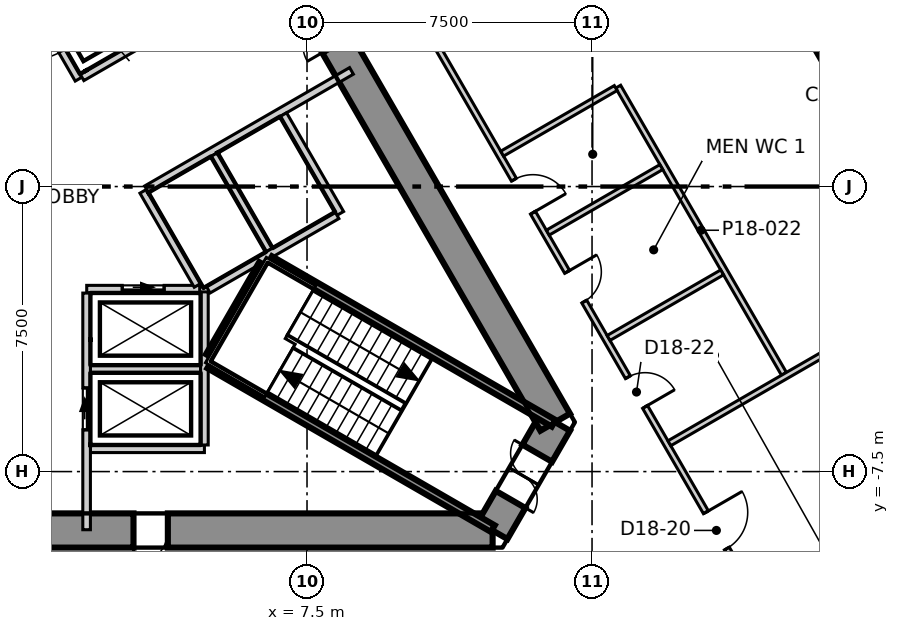
"""IFC4 building model, lengths in metres.
Left out: names, types, materials, properties, quantities, classifications, styles, units other than length and angle.
Written with IfcOpenShell. Run it as: python <this file> out.ifc"""

import sys

from ifc_helpers import new_model, si_unit, direction, frame, frame_2d, origin, origin_2d, place, context, subcontext, project, spatial, polyline, rectangle, outline, extrude, element, fill, save


model = new_model("IFC4")
c1 = context("Model", 3, precision=1e-05, world=origin(), true_north=direction((0.0, 1.0)))
c2 = subcontext(c1, "Body", "Model", "MODEL_VIEW")
j1 = project(units=[si_unit("LENGTHUNIT", "METRE"), si_unit("PLANEANGLEUNIT", "RADIAN")], contexts=[c1])
p1 = place(None, origin())
s1 = spatial("IfcSite", under=j1, at=p1, CompositionType="ELEMENT")
p2 = place(p1, origin())
s2 = spatial("IfcBuilding", under=s1, at=p2, CompositionType="ELEMENT")
p3 = place(p2, frame((0.0, 0.0, 83.3)))
s3 = spatial("IfcBuildingStorey", under=s2, at=p3, CompositionType="ELEMENT", Elevation=83.3)
p4 = place(p3, frame((-12.384, -9.05, -0.3), z_axis=(0.0, 0.0, 1.0), x_axis=(1.0, 0.0, 0.0)))
e1 = element("IfcWall", 1, at=p4, inside=s3, PredefinedType="SHEAR", context=c2, shape_type="SweptSolid", body=[
    extrude(outline(polyline([(-0.26, -0.45), (1.685, -0.45), (3.63, -0.45), (5.576, -0.45), (7.521, -0.45), (9.466, -0.45), (11.411, -0.45), (13.357, -0.45), (15.302, -0.45), (17.247, -0.45), (19.192, -0.45), (21.138, -0.45), (23.083, -0.45), (25.028, -0.45), (24.508, 0.45), (22.643, 0.45), (20.778, 0.45), (18.912, 0.45), (17.047, 0.45), (15.182, 0.45), (13.317, 0.45), (11.451, 0.45), (9.586, 0.45), (7.721, 0.45), (5.856, 0.45), (3.99, 0.45), (2.125, 0.45), (0.26, 0.45), (-0.26, -0.45)])), origin(), (0.0, 0.0, 1.0), 4.0),
])
p5 = place(p4, frame((4.05, 0.0, 0.3)))
e2 = element("IfcOpeningElement", 2, at=p5, cuts=e1, PredefinedType="OPENING", context=c2, shape_type="SweptSolid", body=[
    extrude(rectangle(XDim=0.9, YDim=2.1, at=frame_2d((0.45, 1.05))), frame((0.0, 0.46, 0.0), z_axis=(0.0, -1.0, 0.0), x_axis=(1.0, 0.0, 0.0)), (0.0, 0.0, 1.0), 0.92),
])
p6 = place(p4, frame((15.32, 0.0, 0.3)))
e3 = element("IfcOpeningElement", 3, at=p6, cuts=e1, PredefinedType="OPENING", context=c2, shape_type="SweptSolid", body=[
    extrude(rectangle(XDim=0.9, YDim=2.1, at=frame_2d((0.45, 1.05))), frame((0.0, 0.46, 0.0), z_axis=(0.0, -1.0, 0.0), x_axis=(1.0, 0.0, 0.0)), (0.0, 0.0, 1.0), 0.92),
])
p7 = place(p3, frame((12.384, -9.05, -0.3), z_axis=(0.0, 0.0, 1.0), x_axis=(0.500111984565, 0.865960739811, 0.0)))
e4 = element("IfcWall", 4, at=p7, inside=s3, PredefinedType="SHEAR", context=c2, shape_type="SweptSolid", body=[
    extrude(outline(polyline([(-0.26, -0.45), (1.646, -0.449), (3.551, -0.449), (3.031, 0.45), (1.646, 0.45), (0.26, 0.45), (-0.26, -0.45)])), origin(), (0.0, 0.0, 1.0), 4.0),
])
p8 = place(p7, frame((0.946, 0.0, 0.3)))
e5 = element("IfcOpeningElement", 5, at=p8, cuts=e4, PredefinedType="OPENING", context=c2, shape_type="SweptSolid", body=[
    extrude(rectangle(XDim=1.4, YDim=2.1, at=frame_2d((0.7, 1.05))), frame((0.0, 0.46, 0.0), z_axis=(0.0, -1.0, 0.0), x_axis=(1.0, 0.0, 0.0)), (0.0, 0.0, 1.0), 0.92),
])
p9 = place(p3, frame((14.03, -6.2, -0.3), z_axis=(0.0, 0.0, 1.0), x_axis=(-0.500026485275, 0.866010111964, 0.0)))
e6 = element("IfcWall", 6, at=p9, inside=s3, PredefinedType="SHEAR", context=c2, shape_type="SweptSolid", body=[
    extrude(outline(polyline([(-0.26, -0.449), (1.685, -0.449), (3.63, -0.449), (5.576, -0.449), (7.521, -0.449), (9.466, -0.449), (11.411, -0.449), (13.357, -0.449), (15.302, -0.449), (17.247, -0.45), (19.192, -0.45), (21.138, -0.45), (23.083, -0.45), (25.028, -0.45), (24.509, 0.449), (22.644, 0.449), (20.778, 0.449), (18.913, 0.449), (17.048, 0.449), (15.182, 0.449), (13.317, 0.449), (11.452, 0.449), (9.587, 0.449), (7.721, 0.45), (5.856, 0.45), (3.991, 0.45), (2.125, 0.45), (0.26, 0.45), (-0.26, -0.449)])), origin(), (0.0, 0.0, 1.0), 4.0),
])
p10 = place(p9, frame((11.484, 0.0, 0.3)))
e7 = element("IfcOpeningElement", 7, at=p10, cuts=e6, PredefinedType="OPENING", context=c2, shape_type="SweptSolid", body=[
    extrude(rectangle(XDim=1.8, YDim=2.1, at=frame_2d((0.9, 1.05))), frame((0.0, 0.46, 0.0), z_axis=(0.0, -1.0, 0.0), x_axis=(1.0, 0.0, 0.0)), (0.0, 0.0, 1.0), 0.92),
])
p11 = place(p9, frame((18.926, 0.0, 0.3)))
e8 = element("IfcOpeningElement", 8, at=p11, cuts=e6, PredefinedType="OPENING", context=c2, shape_type="SweptSolid", body=[
    extrude(rectangle(XDim=1.0, YDim=2.1, at=frame_2d((0.5, 1.05))), frame((0.0, 0.46, 0.0), z_axis=(0.0, -1.0, 0.0), x_axis=(1.0, 0.0, 0.0)), (0.0, 0.0, 1.0), 0.92),
])
p12 = place(p3, frame((21.284, 3.993, -0.3), z_axis=(0.0, 0.0, 1.0), x_axis=(-0.5, 0.866025403784, 0.0)))
e9 = element("IfcColumn", 9, at=p12, inside=s3, PredefinedType="COLUMN", context=c2, shape_type="SweptSolid", body=[
    extrude(rectangle(XDim=1.4, YDim=1.1, at=origin_2d()), origin(), (0.0, 0.0, 1.0), 4.0),
])
p13 = place(p3, frame((33.317, -15.448, 0.0), z_axis=(0.0, 0.0, 1.0), x_axis=(-0.499999874703, 0.866025476125, 0.0)))
e10 = element("IfcWall", 10, at=p13, inside=s3, PredefinedType="ELEMENTEDWALL", context=c2, shape_type="SweptSolid", body=[
    extrude(rectangle(XDim=60.054, YDim=0.2, at=frame_2d((30.027, 0.0))), origin(), (0.0, 0.0, 1.0), 3.7),
])
p14 = place(p13, frame((2.094, 0.0, 0.9)))
e11 = element("IfcOpeningElement", 11, at=p14, cuts=e10, PredefinedType="OPENING", context=c2, shape_type="SweptSolid", body=[
    extrude(rectangle(XDim=5.6, YDim=2.5, at=frame_2d((2.8, 1.25))), frame((0.0, 0.11, 0.0), z_axis=(0.0, -1.0, 0.0), x_axis=(1.0, 0.0, 0.0)), (0.0, 0.0, 1.0), 0.22),
])
p15 = place(p13, frame((9.278, 0.0, 0.9)))
e12 = element("IfcOpeningElement", 12, at=p15, cuts=e10, PredefinedType="OPENING", context=c2, shape_type="SweptSolid", body=[
    extrude(rectangle(XDim=5.6, YDim=2.5, at=frame_2d((2.8, 1.25))), frame((0.0, 0.11, 0.0), z_axis=(0.0, -1.0, 0.0), x_axis=(1.0, 0.0, 0.0)), (0.0, 0.0, 1.0), 0.22),
])
p16 = place(p13, frame((16.462, 0.0, 0.9)))
e13 = element("IfcOpeningElement", 13, at=p16, cuts=e10, PredefinedType="OPENING", context=c2, shape_type="SweptSolid", body=[
    extrude(rectangle(XDim=5.6, YDim=2.5, at=frame_2d((2.8, 1.25))), frame((0.0, 0.11, 0.0), z_axis=(0.0, -1.0, 0.0), x_axis=(1.0, 0.0, 0.0)), (0.0, 0.0, 1.0), 0.22),
])
p17 = place(p13, frame((23.645, 0.0, 0.9)))
e14 = element("IfcOpeningElement", 14, at=p17, cuts=e10, PredefinedType="OPENING", context=c2, shape_type="SweptSolid", body=[
    extrude(rectangle(XDim=5.6, YDim=2.5, at=frame_2d((2.8, 1.25))), frame((0.0, 0.11, 0.0), z_axis=(0.0, -1.0, 0.0), x_axis=(1.0, 0.0, 0.0)), (0.0, 0.0, 1.0), 0.22),
])
p18 = place(p13, frame((30.829, 0.0, 0.9)))
e15 = element("IfcOpeningElement", 15, at=p18, cuts=e10, PredefinedType="OPENING", context=c2, shape_type="SweptSolid", body=[
    extrude(rectangle(XDim=5.6, YDim=2.5, at=frame_2d((2.8, 1.25))), frame((0.0, 0.11, 0.0), z_axis=(0.0, -1.0, 0.0), x_axis=(1.0, 0.0, 0.0)), (0.0, 0.0, 1.0), 0.22),
])
p19 = place(p13, frame((38.012, 0.0, 0.9)))
e16 = element("IfcOpeningElement", 16, at=p19, cuts=e10, PredefinedType="OPENING", context=c2, shape_type="SweptSolid", body=[
    extrude(rectangle(XDim=5.6, YDim=2.5, at=frame_2d((2.8, 1.25))), frame((0.0, 0.11, 0.0), z_axis=(0.0, -1.0, 0.0), x_axis=(1.0, 0.0, 0.0)), (0.0, 0.0, 1.0), 0.22),
])
p20 = place(p13, frame((45.196, 0.0, 0.9)))
e17 = element("IfcOpeningElement", 17, at=p20, cuts=e10, PredefinedType="OPENING", context=c2, shape_type="SweptSolid", body=[
    extrude(rectangle(XDim=5.6, YDim=2.5, at=frame_2d((2.8, 1.25))), frame((0.0, 0.11, 0.0), z_axis=(0.0, -1.0, 0.0), x_axis=(1.0, 0.0, 0.0)), (0.0, 0.0, 1.0), 0.22),
])
p21 = place(p13, frame((52.379, 0.0, 0.9)))
e18 = element("IfcOpeningElement", 18, at=p21, cuts=e10, PredefinedType="OPENING", context=c2, shape_type="SweptSolid", body=[
    extrude(rectangle(XDim=5.6, YDim=2.5, at=frame_2d((2.8, 1.25))), frame((0.0, 0.11, 0.0), z_axis=(0.0, -1.0, 0.0), x_axis=(1.0, 0.0, 0.0)), (0.0, 0.0, 1.0), 0.22),
])
p22 = place(p3, frame((0.075, 22.47, 0.0), z_axis=(0.0, 0.0, 1.0), x_axis=(0.500002280369, -0.866024087209, 0.0)))
e19 = element("IfcWall", 19, at=p22, inside=s3, PredefinedType="PARTITIONING", context=c2, shape_type="SweptSolid", body=[
    extrude(rectangle(XDim=38.844, YDim=0.15, at=frame_2d((19.422, 0.0))), origin(), (0.0, 0.0, 1.0), 3.7),
])
p23 = place(p22, frame((35.844, 0.0, 0.0)))
e20 = element("IfcOpeningElement", 20, at=p23, cuts=e19, PredefinedType="OPENING", context=c2, shape_type="SweptSolid", body=[
    extrude(rectangle(XDim=1.1, YDim=2.1, at=frame_2d((0.55, 1.05))), frame((0.0, 0.085, 0.0), z_axis=(0.0, -1.0, 0.0), x_axis=(1.0, 0.0, 0.0)), (0.0, 0.0, 1.0), 0.17),
])
p24 = place(p22, frame((14.44, 0.0, 0.0)))
e21 = element("IfcOpeningElement", 21, at=p24, cuts=e19, PredefinedType="OPENING", context=c2, shape_type="SweptSolid", body=[
    extrude(rectangle(XDim=1.1, YDim=2.1, at=frame_2d((0.55, 1.05))), frame((0.0, 0.085, 0.0), z_axis=(0.0, -1.0, 0.0), x_axis=(1.0, 0.0, 0.0)), (0.0, 0.0, 1.0), 0.17),
])
p25 = place(p22, frame((31.74, 0.0, 0.0)))
e22 = element("IfcOpeningElement", 22, at=p25, cuts=e19, PredefinedType="OPENING", context=c2, shape_type="SweptSolid", body=[
    extrude(rectangle(XDim=0.9, YDim=2.1, at=frame_2d((0.45, 1.05))), frame((0.0, 0.085, 0.0), z_axis=(0.0, -1.0, 0.0), x_axis=(1.0, 0.0, 0.0)), (0.0, 0.0, 1.0), 0.17),
])
p26 = place(p22, frame((28.54, 0.0, 0.0)))
e23 = element("IfcOpeningElement", 23, at=p26, cuts=e19, PredefinedType="OPENING", context=c2, shape_type="SweptSolid", body=[
    extrude(rectangle(XDim=0.9, YDim=2.1, at=frame_2d((0.45, 1.05))), frame((0.0, 0.085, 0.0), z_axis=(0.0, -1.0, 0.0), x_axis=(1.0, 0.0, 0.0)), (0.0, 0.0, 1.0), 0.17),
])
p27 = place(p22, frame((25.74, 0.0, 0.0)))
e24 = element("IfcOpeningElement", 24, at=p27, cuts=e19, PredefinedType="OPENING", context=c2, shape_type="SweptSolid", body=[
    extrude(rectangle(XDim=1.0, YDim=2.1, at=frame_2d((0.5, 1.05))), frame((0.0, 0.085, 0.0), z_axis=(0.0, -1.0, 0.0), x_axis=(1.0, 0.0, 0.0)), (0.0, 0.0, 1.0), 0.17),
])
p28 = place(p22, frame((1.905, 0.0, 0.0)))
e25 = element("IfcOpeningElement", 25, at=p28, cuts=e19, PredefinedType="OPENING", context=c2, shape_type="SweptSolid", body=[
    extrude(rectangle(XDim=1.1, YDim=2.1, at=frame_2d((0.55, 1.05))), frame((0.0, 0.085, 0.0), z_axis=(0.0, -1.0, 0.0), x_axis=(1.0, 0.0, 0.0)), (0.0, 0.0, 1.0), 0.17),
])
p29 = place(p3, frame((15.688, 2.628, 0.0), z_axis=(0.0, 0.0, 1.0), x_axis=(0.499970334739, -0.866042530354, 0.0)))
e26 = element("IfcWall", 26, at=p29, inside=s3, PredefinedType="PARTITIONING", context=c2, shape_type="SweptSolid", body=[
    extrude(rectangle(XDim=8.725, YDim=0.15, at=frame_2d((4.362, 0.0))), origin(), (0.0, 0.0, 1.0), 3.7),
])
for number, where, z_axis, x_axis in (
    (27, (12.635, 0.866, 0.0), (0.0, 0.0, 1.0), (0.866, 0.5, 0.0)),
    (28, (13.835, -1.213, 0.0), (0.0, 0.0, 1.0), (0.866, 0.5, 0.0)),
    (29, (15.435, -3.984, 0.0), (0.0, 0.0, 1.0), (0.866, 0.5, 0.0)),
):
    element("IfcWall", number, at=place(p3, frame(where, z_axis=z_axis, x_axis=x_axis)), inside=s3, PredefinedType="PARTITIONING", context=c2, shape_type="SweptSolid", body=[
        extrude(rectangle(XDim=3.45, YDim=0.15, at=frame_2d((1.725, 0.0))), origin(), (0.0, 0.0, 1.0), 3.7),
    ])
p30 = place(p3, frame((17.035, -6.755, 0.0), z_axis=(0.0, 0.0, 1.0), x_axis=(0.866035557451, 0.499982412921, 0.0)))
e30 = element("IfcWall", 30, at=p30, inside=s3, PredefinedType="PARTITIONING", context=c2, shape_type="SweptSolid", body=[
    extrude(rectangle(XDim=9.674, YDim=0.15, at=frame_2d((4.837, 0.0))), origin(), (0.0, 0.0, 1.0), 3.7),
])
p31 = place(p3, frame((1.8, -4.8, 0.0), z_axis=(0.0, 0.0, 1.0), x_axis=(1.0, 0.0, 0.0)))
e31 = element("IfcWall", 31, at=p31, inside=s3, PredefinedType="SOLIDWALL", context=c2, shape_type="SweptSolid", body=[
    extrude(rectangle(XDim=2.9, YDim=0.2, at=frame_2d((1.45, 0.0))), origin(), (0.0, 0.0, 1.0), 3.7),
])
p32 = place(p3, frame((1.8, -6.9, 0.0), z_axis=(0.0, 0.0, 1.0), x_axis=(1.0, 0.0, 0.0)))
e32 = element("IfcWall", 32, at=p32, inside=s3, PredefinedType="SOLIDWALL", context=c2, shape_type="SweptSolid", body=[
    extrude(rectangle(XDim=3.0, YDim=0.2, at=frame_2d((1.5, 0.0))), origin(), (0.0, 0.0, 1.0), 3.7),
])
p33 = place(p3, frame((1.703, -2.7, 0.0), z_axis=(0.0, 0.0, 1.0), x_axis=(1.0, 0.0, 0.0)))
e33 = element("IfcWall", 33, at=p33, inside=s3, PredefinedType="SOLIDWALL", context=c2, shape_type="SweptSolid", body=[
    extrude(rectangle(XDim=2.973, YDim=0.2, at=frame_2d((1.487, 0.0))), origin(), (0.0, 0.0, 1.0), 3.7),
])
p34 = place(p33, frame((0.936, 0.0, 0.0)))
e34 = element("IfcOpeningElement", 34, at=p34, cuts=e33, PredefinedType="OPENING", context=c2, shape_type="SweptSolid", body=[
    extrude(rectangle(XDim=1.1, YDim=2.1, at=frame_2d((0.55, 1.05))), frame((0.0, 0.11, 0.0), z_axis=(0.0, -1.0, 0.0), x_axis=(1.0, 0.0, 0.0)), (0.0, 0.0, 1.0), 0.22),
])
p35 = place(p3, frame((0.0, 5.4, 0.0), z_axis=(0.0, 0.0, 1.0), x_axis=(0.500103862429, -0.865965430478, 0.0)))
e35 = element("IfcWall", 35, at=p35, inside=s3, PredefinedType="SOLIDWALL", context=c2, shape_type="SweptSolid", body=[
    extrude(rectangle(XDim=2.973, YDim=0.2, at=frame_2d((1.487, 0.0))), origin(), (0.0, 0.0, 1.0), 3.7),
])
p36 = place(p35, frame((0.937, 0.0, 0.0)))
e36 = element("IfcOpeningElement", 36, at=p36, cuts=e35, PredefinedType="OPENING", context=c2, shape_type="SweptSolid", body=[
    extrude(rectangle(XDim=1.1, YDim=2.1, at=frame_2d((0.55, 1.05))), frame((0.0, 0.11, 0.0), z_axis=(0.0, -1.0, 0.0), x_axis=(1.0, 0.0, 0.0)), (0.0, 0.0, 1.0), 0.22),
])
p37 = place(p3, frame((3.19, -0.125, 0.0), z_axis=(0.0, 0.0, 1.0), x_axis=(0.499988658015, -0.866031951983, 0.0)))
e37 = element("IfcWall", 37, at=p37, inside=s3, PredefinedType="SOLIDWALL", context=c2, shape_type="SweptSolid", body=[
    extrude(rectangle(XDim=2.858, YDim=0.2, at=frame_2d((1.429, 0.0))), origin(), (0.0, 0.0, 1.0), 3.7),
])
p38 = place(p3, frame((1.578, 2.874, 0.0), z_axis=(0.0, 0.0, 1.0), x_axis=(0.866031483044, 0.499989470266, 0.0)))
e38 = element("IfcWall", 38, at=p38, inside=s3, PredefinedType="SOLIDWALL", context=c2, shape_type="SweptSolid", body=[
    extrude(rectangle(XDim=6.226, YDim=0.2, at=frame_2d((3.113, 0.0))), origin(), (0.0, 0.0, 1.0), 3.7),
])
p39 = place(p38, frame((2.496, 0.0, 0.0)))
e39 = element("IfcOpeningElement", 39, at=p39, cuts=e38, PredefinedType="OPENING", context=c2, shape_type="SweptSolid", body=[
    extrude(rectangle(XDim=1.1, YDim=2.1, at=frame_2d((0.55, 1.05))), frame((0.0, 0.11, 0.0), z_axis=(0.0, -1.0, 0.0), x_axis=(1.0, 0.0, 0.0)), (0.0, 0.0, 1.0), 0.22),
])
p40 = place(p3, frame((1.7, -9.03, 0.0), z_axis=(0.0, 0.0, 1.0), x_axis=(0.0, 1.0, 0.0)))
e40 = element("IfcWall", 40, at=p40, inside=s3, PredefinedType="SOLIDWALL", context=c2, shape_type="SweptSolid", body=[
    extrude(rectangle(XDim=6.227, YDim=0.2, at=frame_2d((3.114, 0.0))), origin(), (0.0, 0.0, 1.0), 3.7),
])
p41 = place(p40, frame((2.63, 0.0, 0.0)))
e41 = element("IfcOpeningElement", 41, at=p41, cuts=e40, PredefinedType="OPENING", context=c2, shape_type="SweptSolid", body=[
    extrude(rectangle(XDim=1.1, YDim=2.1, at=frame_2d((0.55, 1.05))), frame((0.0, 0.11, 0.0), z_axis=(0.0, -1.0, 0.0), x_axis=(1.0, 0.0, 0.0)), (0.0, 0.0, 1.0), 0.22),
])
p42 = place(p3, frame((4.8, -6.8, 0.0), z_axis=(0.0, 0.0, 1.0), x_axis=(0.0, 1.0, 0.0)))
e42 = element("IfcWall", 42, at=p42, inside=s3, PredefinedType="SOLIDWALL", context=c2, shape_type="SweptSolid", body=[
    extrude(rectangle(XDim=4.029, YDim=0.2, at=frame_2d((2.015, 0.0))), origin(), (0.0, 0.0, 1.0), 3.7),
])
p43 = place(p3, frame((3.278, -0.071, 0.0), z_axis=(0.0, 0.0, 1.0), x_axis=(0.865953757655, 0.500124074208, 0.0)))
e43 = element("IfcWall", 43, at=p43, inside=s3, PredefinedType="SOLIDWALL", context=c2, shape_type="SweptSolid", body=[
    extrude(rectangle(XDim=6.227, YDim=0.2, at=frame_2d((3.113, 0.0))), origin(), (0.0, 0.0, 1.0), 3.7),
])
p44 = place(p3, frame((6.876, 1.891, 0.0), z_axis=(0.0, 0.0, 1.0), x_axis=(0.499990139034, -0.866031096941, 0.0)))
e44 = element("IfcWall", 44, at=p44, inside=s3, PredefinedType="SOLIDWALL", context=c2, shape_type="SweptSolid", body=[
    extrude(rectangle(XDim=3.0, YDim=0.2, at=frame_2d((1.5, 0.0))), origin(), (0.0, 0.0, 1.0), 3.7),
])
p45 = place(p3, frame((5.057, 0.841, 0.0), z_axis=(0.0, 0.0, 1.0), x_axis=(0.50012328804, -0.865954211699, 0.0)))
e45 = element("IfcWall", 45, at=p45, inside=s3, PredefinedType="SOLIDWALL", context=c2, shape_type="SweptSolid", body=[
    extrude(rectangle(XDim=2.9, YDim=0.2, at=frame_2d((1.45, 0.0))), origin(), (0.0, 0.0, 1.0), 3.7),
])
p46 = place(p3, frame((4.9, -2.714, 0.0), z_axis=(0.0, 0.0, 1.0), x_axis=(0.865992350556, 0.500057245502, 0.0)))
e46 = element("IfcWall", 46, at=p46, inside=s3, PredefinedType="SOLIDWALL", context=c2, shape_type="SweptSolid", body=[
    extrude(rectangle(XDim=3.914, YDim=0.2, at=frame_2d((1.957, 0.0))), origin(), (0.0, 0.0, 1.0), 3.7),
])
p47 = place(p3, frame((4.929, -4.693, 0.0), z_axis=(0.0, 0.0, 1.0), x_axis=(0.866010975815, -0.500024989144, 0.0)))
e47 = element("IfcWall", 47, at=p47, inside=s3, PredefinedType="SOLIDWALL", context=c2, shape_type="SweptSolid", body=[
    extrude(rectangle(XDim=8.615, YDim=0.2, at=frame_2d((4.308, 0.0))), origin(), (0.0, 0.0, 1.0), 3.7),
])
p48 = place(p3, frame((4.929, -4.462, 0.0), z_axis=(0.0, 0.0, 1.0), x_axis=(0.500200581029, 0.865909567298, 0.0)))
e48 = element("IfcWall", 48, at=p48, inside=s3, PredefinedType="SOLIDWALL", context=c2, shape_type="SweptSolid", body=[
    extrude(rectangle(XDim=2.799, YDim=0.2, at=frame_2d((1.399, 0.0))), origin(), (0.0, 0.0, 1.0), 3.7),
])
p49 = place(p3, frame((6.529, -1.922, 0.0), z_axis=(0.0, 0.0, 1.0), x_axis=(0.866060059011, -0.499939970583, 0.0)))
e49 = element("IfcWall", 49, at=p49, inside=s3, PredefinedType="SOLIDWALL", context=c2, shape_type="SweptSolid", body=[
    extrude(rectangle(XDim=8.615, YDim=0.2, at=frame_2d((4.307, 0.0))), origin(), (0.0, 0.0, 1.0), 3.7),
])
p50 = place(p34, origin())
e50 = element("IfcDoor", 50, at=p50, inside=s3, OperationType="SLIDING_TO_LEFT", PredefinedType="DOOR", context=c2, shape_type="SweptSolid", body=[
    extrude(rectangle(XDim=1.1, YDim=2.1, at=frame_2d((0.55, 1.05))), frame((0.0, 0.025, 0.0), z_axis=(0.0, -1.0, 0.0), x_axis=(1.0, 0.0, 0.0)), (0.0, 0.0, 1.0), 0.05),
])
fill(e34, e50)
p51 = place(p41, origin())
e51 = element("IfcDoor", 51, at=p51, inside=s3, OperationType="SLIDING_TO_LEFT", PredefinedType="DOOR", context=c2, shape_type="SweptSolid", body=[
    extrude(rectangle(XDim=1.1, YDim=2.1, at=frame_2d((0.55, 1.05))), frame((0.0, 0.025, 0.0), z_axis=(0.0, -1.0, 0.0), x_axis=(1.0, 0.0, 0.0)), (0.0, 0.0, 1.0), 0.05),
])
fill(e41, e51)
p52 = place(p23, origin())
e52 = element("IfcDoor", 52, at=p52, inside=s3, OperationType="SINGLE_SWING_RIGHT", PredefinedType="DOOR", context=c2, shape_type="SweptSolid", body=[
    extrude(rectangle(XDim=1.1, YDim=2.1, at=frame_2d((0.55, 1.05))), frame((0.0, 0.025, 0.0), z_axis=(0.0, -1.0, 0.0), x_axis=(1.0, 0.0, 0.0)), (0.0, 0.0, 1.0), 0.05),
])
fill(e20, e52)
p53 = place(p25, origin())
e53 = element("IfcDoor", 53, at=p53, inside=s3, OperationType="SINGLE_SWING_LEFT", PredefinedType="DOOR", context=c2, shape_type="SweptSolid", body=[
    extrude(rectangle(XDim=0.9, YDim=2.1, at=frame_2d((0.45, 1.05))), frame((0.0, 0.025, 0.0), z_axis=(0.0, -1.0, 0.0), x_axis=(1.0, 0.0, 0.0)), (0.0, 0.0, 1.0), 0.05),
])
fill(e22, e53)
p54 = place(p26, origin())
e54 = element("IfcDoor", 54, at=p54, inside=s3, OperationType="SINGLE_SWING_RIGHT", PredefinedType="DOOR", context=c2, shape_type="SweptSolid", body=[
    extrude(rectangle(XDim=0.9, YDim=2.1, at=frame_2d((0.45, 1.05))), frame((0.0, 0.025, 0.0), z_axis=(0.0, -1.0, 0.0), x_axis=(1.0, 0.0, 0.0)), (0.0, 0.0, 1.0), 0.05),
])
fill(e23, e54)
p55 = place(p27, origin())
e55 = element("IfcDoor", 55, at=p55, inside=s3, OperationType="SINGLE_SWING_LEFT", PredefinedType="DOOR", context=c2, shape_type="SweptSolid", body=[
    extrude(rectangle(XDim=1.0, YDim=2.1, at=frame_2d((0.5, 1.05))), frame((0.0, 0.025, 0.0), z_axis=(0.0, -1.0, 0.0), x_axis=(1.0, 0.0, 0.0)), (0.0, 0.0, 1.0), 0.05),
])
fill(e24, e55)
p56 = place(p8, origin())
e56 = element("IfcDoor", 56, at=p56, inside=s3, OperationType="DOUBLE_DOOR_SINGLE_SWING", PredefinedType="DOOR", context=c2, shape_type="SweptSolid", body=[
    extrude(rectangle(XDim=1.4, YDim=2.1, at=frame_2d((0.7, 1.05))), frame((0.0, 0.025, 0.0), z_axis=(0.0, -1.0, 0.0), x_axis=(1.0, 0.0, 0.0)), (0.0, 0.0, 1.0), 0.05),
])
fill(e5, e56)
p57 = place(p6, origin())
e57 = element("IfcDoor", 57, at=p57, inside=s3, OperationType="SINGLE_SWING_LEFT", PredefinedType="DOOR", context=c2, shape_type="SweptSolid", body=[
    extrude(rectangle(XDim=0.9, YDim=2.1, at=frame_2d((0.45, 1.05))), frame((0.0, 0.025, 0.0), z_axis=(0.0, -1.0, 0.0), x_axis=(1.0, 0.0, 0.0)), (0.0, 0.0, 1.0), 0.05),
])
fill(e3, e57)
save(model, sys.argv[1])
